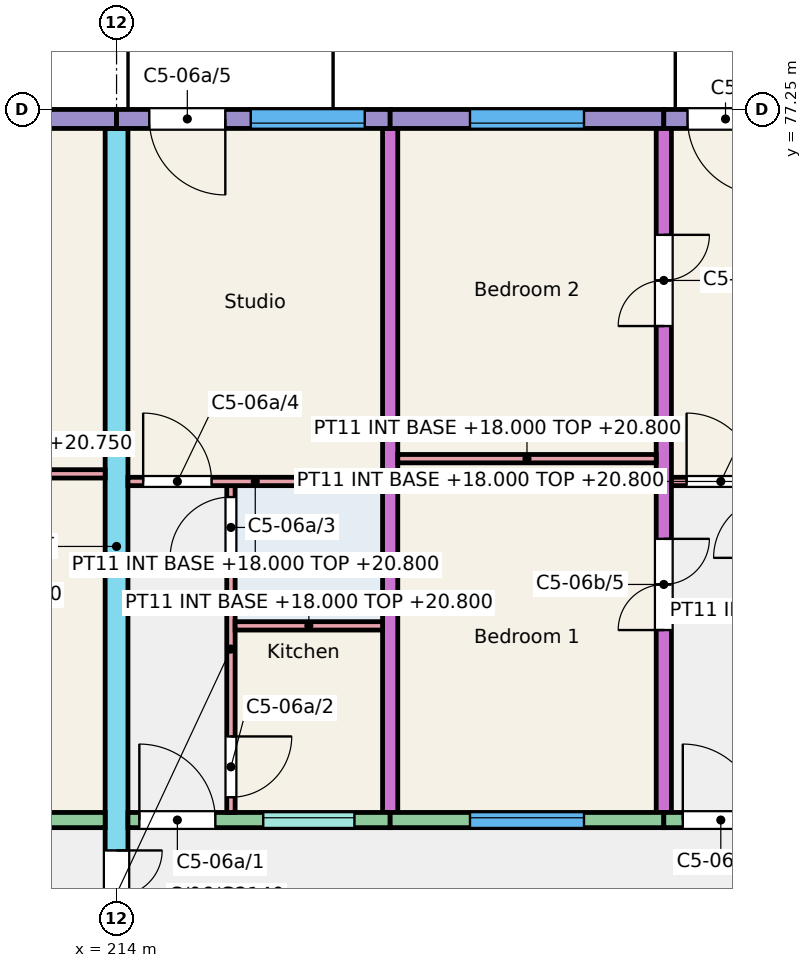
"""IFC4 building model, lengths in metres.
Left out: names, types, materials, properties, quantities, classifications, styles, units other than length and angle.
Written with IfcOpenShell. Run it as: python <this file> out.ifc"""

import sys

from ifc_helpers import new_model, si_unit, direction, frame, frame_2d, origin, place, context, subcontext, project, spatial, rectangle, extrude, element, fill, save


model = new_model("IFC4")
c1 = context("Model", 3, precision=1e-05, world=origin(), true_north=direction((0.0, 1.0)))
c2 = subcontext(c1, "Body", "Model", "MODEL_VIEW")
j1 = project(units=[si_unit("LENGTHUNIT", "METRE"), si_unit("PLANEANGLEUNIT", "RADIAN")], contexts=[c1])
p1 = place(None, origin())
s1 = spatial("IfcSite", under=j1, at=p1, CompositionType="ELEMENT")
p2 = place(p1, origin())
s2 = spatial("IfcBuilding", under=s1, at=p2, CompositionType="ELEMENT")
p3 = place(p2, frame((0.0, 0.0, 18.0)))
s3 = spatial("IfcBuildingStorey", under=s2, at=p3, CompositionType="ELEMENT", Elevation=18.0)
p4 = place(p3, frame((214.0, 66.0, 0.0), z_axis=(0.0, 0.0, 1.0), x_axis=(0.0, 1.0, 0.0)))
e1 = element("IfcWall", 1, at=p4, inside=s3, PredefinedType="SHEAR", context=c2, shape_type="SweptSolid", body=[
    extrude(rectangle(XDim=11.0, YDim=0.3, at=frame_2d((5.5, 0.0))), origin(), (0.0, 0.0, 1.0), 3.0),
])
p5 = place(p4, frame((0.3, 0.0, 0.0)))
e2 = element("IfcOpeningElement", 2, at=p5, cuts=e1, PredefinedType="OPENING", context=c2, shape_type="SweptSolid", body=[
    extrude(rectangle(XDim=1.2, YDim=2.1, at=frame_2d((0.6, 1.05))), frame((0.0, 0.16, 0.0), z_axis=(0.0, -1.0, 0.0), x_axis=(1.0, 0.0, 0.0)), (0.0, 0.0, 1.0), 0.32),
])
p6 = place(p3, frame((217.6, 68.0, 0.0), z_axis=(0.0, 0.0, 1.0), x_axis=(0.0, 1.0, 0.0)))
e3 = element("IfcWall", 3, at=p6, inside=s3, PredefinedType="SHEAR", context=c2, shape_type="SweptSolid", body=[
    extrude(rectangle(XDim=9.0, YDim=0.2, at=frame_2d((4.5, 0.0))), origin(), (0.0, 0.0, 1.0), 3.0),
])
p7 = place(p3, frame((221.2, 68.0, 0.0), z_axis=(0.0, 0.0, 1.0), x_axis=(0.0, 1.0, 0.0)))
e4 = element("IfcWall", 4, at=p7, inside=s3, PredefinedType="SHEAR", context=c2, shape_type="SweptSolid", body=[
    extrude(rectangle(XDim=9.0, YDim=0.2, at=frame_2d((4.5, 0.0))), origin(), (0.0, 0.0, 1.0), 3.0),
])
p8 = place(p7, frame((2.4, 0.0, 0.0)))
e5 = element("IfcOpeningElement", 5, at=p8, cuts=e4, PredefinedType="OPENING", context=c2, shape_type="SweptSolid", body=[
    extrude(rectangle(XDim=1.2, YDim=2.1, at=frame_2d((0.6, 1.05))), frame((0.0, 0.11, 0.0), z_axis=(0.0, -1.0, 0.0), x_axis=(1.0, 0.0, 0.0)), (0.0, 0.0, 1.0), 0.22),
])
p9 = place(p7, frame((6.4, 0.0, 0.0)))
e6 = element("IfcOpeningElement", 6, at=p9, cuts=e4, PredefinedType="OPENING", context=c2, shape_type="SweptSolid", body=[
    extrude(rectangle(XDim=1.2, YDim=2.1, at=frame_2d((0.6, 1.05))), frame((0.0, 0.11, 0.0), z_axis=(0.0, -1.0, 0.0), x_axis=(1.0, 0.0, 0.0)), (0.0, 0.0, 1.0), 0.22),
])
p10 = place(p3, frame((210.4, 77.125, 0.0), z_axis=(0.0, 0.0, 1.0), x_axis=(1.0, 0.0, 0.0)))
e7 = element("IfcWall", 7, at=p10, inside=s3, PredefinedType="SOLIDWALL", context=c2, shape_type="SweptSolid", body=[
    extrude(rectangle(XDim=3.6, YDim=0.25, at=frame_2d((1.8, 0.0))), origin(), (0.0, 0.0, 1.0), 3.0),
])
p11 = place(p10, frame((1.175, 0.0, 1.1)))
e8 = element("IfcOpeningElement", 8, at=p11, cuts=e7, PredefinedType="OPENING", context=c2, shape_type="SweptSolid", body=[
    extrude(rectangle(XDim=1.2, YDim=1.3, at=frame_2d((0.6, 0.65))), frame((0.0, 0.135, 0.0), z_axis=(0.0, -1.0, 0.0), x_axis=(1.0, 0.0, 0.0)), (0.0, 0.0, 1.0), 0.27),
])
p12 = place(p3, frame((210.4, 67.9, 0.0), z_axis=(0.0, 0.0, 1.0), x_axis=(1.0, 0.0, 0.0)))
e9 = element("IfcWall", 9, at=p12, inside=s3, PredefinedType="SOLIDWALL", context=c2, shape_type="SweptSolid", body=[
    extrude(rectangle(XDim=3.45, YDim=0.2, at=frame_2d((1.725, 0.0))), origin(), (0.0, 0.0, 1.0), 3.0),
])
p13 = place(p12, frame((1.025, 0.0, 0.9)))
e10 = element("IfcOpeningElement", 10, at=p13, cuts=e9, PredefinedType="OPENING", context=c2, shape_type="SweptSolid", body=[
    extrude(rectangle(XDim=1.5, YDim=1.5, at=frame_2d((0.75, 0.75))), frame((0.0, 0.11, 0.0), z_axis=(0.0, -1.0, 0.0), x_axis=(1.0, 0.0, 0.0)), (0.0, 0.0, 1.0), 0.22),
])
p14 = place(p3, frame((214.0, 77.125, 0.0), z_axis=(0.0, 0.0, 1.0), x_axis=(1.0, 0.0, 0.0)))
e11 = element("IfcWall", 11, at=p14, inside=s3, PredefinedType="SOLIDWALL", context=c2, shape_type="SweptSolid", body=[
    extrude(rectangle(XDim=3.6, YDim=0.25, at=frame_2d((1.8, 0.0))), origin(), (0.0, 0.0, 1.0), 3.0),
])
p15 = place(p14, frame((1.765, 0.0, 0.9)))
e12 = element("IfcOpeningElement", 12, at=p15, cuts=e11, PredefinedType="OPENING", context=c2, shape_type="SweptSolid", body=[
    extrude(rectangle(XDim=1.5, YDim=1.5, at=frame_2d((0.75, 0.75))), frame((0.0, 0.135, 0.0), z_axis=(0.0, -1.0, 0.0), x_axis=(1.0, 0.0, 0.0)), (0.0, 0.0, 1.0), 0.27),
])
p16 = place(p14, frame((0.431, 0.0, 0.0)))
e13 = element("IfcOpeningElement", 13, at=p16, cuts=e11, PredefinedType="OPENING", context=c2, shape_type="SweptSolid", body=[
    extrude(rectangle(XDim=1.0, YDim=2.1, at=frame_2d((0.5, 1.05))), frame((0.0, 0.135, 0.0), z_axis=(0.0, -1.0, 0.0), x_axis=(1.0, 0.0, 0.0)), (0.0, 0.0, 1.0), 0.27),
])
p17 = place(p3, frame((214.15, 67.9, 0.0), z_axis=(0.0, 0.0, 1.0), x_axis=(1.0, 0.0, 0.0)))
e14 = element("IfcWall", 14, at=p17, inside=s3, PredefinedType="SOLIDWALL", context=c2, shape_type="SweptSolid", body=[
    extrude(rectangle(XDim=3.45, YDim=0.2, at=frame_2d((1.725, 0.0))), origin(), (0.0, 0.0, 1.0), 3.0),
])
p18 = place(p17, frame((1.78, 0.0, 1.1)))
e15 = element("IfcOpeningElement", 15, at=p18, cuts=e14, PredefinedType="OPENING", context=c2, shape_type="SweptSolid", body=[
    extrude(rectangle(XDim=1.2, YDim=1.3, at=frame_2d((0.6, 0.65))), frame((0.0, 0.11, 0.0), z_axis=(0.0, -1.0, 0.0), x_axis=(1.0, 0.0, 0.0)), (0.0, 0.0, 1.0), 0.22),
])
p19 = place(p17, frame((0.15, 0.0, 0.0)))
e16 = element("IfcOpeningElement", 16, at=p19, cuts=e14, PredefinedType="OPENING", context=c2, shape_type="SweptSolid", body=[
    extrude(rectangle(XDim=1.0, YDim=2.1, at=frame_2d((0.5, 1.05))), frame((0.0, 0.11, 0.0), z_axis=(0.0, -1.0, 0.0), x_axis=(1.0, 0.0, 0.0)), (0.0, 0.0, 1.0), 0.22),
])
p20 = place(p3, frame((217.6, 77.125, 0.0), z_axis=(0.0, 0.0, 1.0), x_axis=(1.0, 0.0, 0.0)))
e17 = element("IfcWall", 17, at=p20, inside=s3, PredefinedType="SOLIDWALL", context=c2, shape_type="SweptSolid", body=[
    extrude(rectangle(XDim=3.6, YDim=0.25, at=frame_2d((1.8, 0.0))), origin(), (0.0, 0.0, 1.0), 3.0),
])
p21 = place(p20, frame((1.05, 0.0, 0.9)))
e18 = element("IfcOpeningElement", 18, at=p21, cuts=e17, PredefinedType="OPENING", context=c2, shape_type="SweptSolid", body=[
    extrude(rectangle(XDim=1.5, YDim=1.5, at=frame_2d((0.75, 0.75))), frame((0.0, 0.135, 0.0), z_axis=(0.0, -1.0, 0.0), x_axis=(1.0, 0.0, 0.0)), (0.0, 0.0, 1.0), 0.27),
])
p22 = place(p3, frame((217.6, 67.9, 0.0), z_axis=(0.0, 0.0, 1.0), x_axis=(1.0, 0.0, 0.0)))
e19 = element("IfcWall", 19, at=p22, inside=s3, PredefinedType="SOLIDWALL", context=c2, shape_type="SweptSolid", body=[
    extrude(rectangle(XDim=3.6, YDim=0.2, at=frame_2d((1.8, 0.0))), origin(), (0.0, 0.0, 1.0), 3.0),
])
p23 = place(p22, frame((1.05, 0.0, 0.9)))
e20 = element("IfcOpeningElement", 20, at=p23, cuts=e19, PredefinedType="OPENING", context=c2, shape_type="SweptSolid", body=[
    extrude(rectangle(XDim=1.5, YDim=1.5, at=frame_2d((0.75, 0.75))), frame((0.0, 0.11, 0.0), z_axis=(0.0, -1.0, 0.0), x_axis=(1.0, 0.0, 0.0)), (0.0, 0.0, 1.0), 0.22),
])
p24 = place(p3, frame((221.2, 77.125, 0.0), z_axis=(0.0, 0.0, 1.0), x_axis=(1.0, 0.0, 0.0)))
e21 = element("IfcWall", 21, at=p24, inside=s3, PredefinedType="SOLIDWALL", context=c2, shape_type="SweptSolid", body=[
    extrude(rectangle(XDim=3.6, YDim=0.25, at=frame_2d((1.8, 0.0))), origin(), (0.0, 0.0, 1.0), 3.0),
])
p25 = place(p24, frame((1.694, 0.0, 0.9)))
e22 = element("IfcOpeningElement", 22, at=p25, cuts=e21, PredefinedType="OPENING", context=c2, shape_type="SweptSolid", body=[
    extrude(rectangle(XDim=1.5, YDim=1.5, at=frame_2d((0.75, 0.75))), frame((0.0, 0.135, 0.0), z_axis=(0.0, -1.0, 0.0), x_axis=(1.0, 0.0, 0.0)), (0.0, 0.0, 1.0), 0.27),
])
p26 = place(p24, frame((0.312, 0.0, 0.0)))
e23 = element("IfcOpeningElement", 23, at=p26, cuts=e21, PredefinedType="OPENING", context=c2, shape_type="SweptSolid", body=[
    extrude(rectangle(XDim=1.0, YDim=2.1, at=frame_2d((0.5, 1.05))), frame((0.0, 0.135, 0.0), z_axis=(0.0, -1.0, 0.0), x_axis=(1.0, 0.0, 0.0)), (0.0, 0.0, 1.0), 0.27),
])
p27 = place(p3, frame((221.2, 67.9, 0.0), z_axis=(0.0, 0.0, 1.0), x_axis=(1.0, 0.0, 0.0)))
e24 = element("IfcWall", 24, at=p27, inside=s3, PredefinedType="SOLIDWALL", context=c2, shape_type="SweptSolid", body=[
    extrude(rectangle(XDim=3.6, YDim=0.2, at=frame_2d((1.8, 0.0))), origin(), (0.0, 0.0, 1.0), 3.0),
])
p28 = place(p27, frame((1.893, 0.0, 1.1)))
e25 = element("IfcOpeningElement", 25, at=p28, cuts=e24, PredefinedType="OPENING", context=c2, shape_type="SweptSolid", body=[
    extrude(rectangle(XDim=1.2, YDim=1.3, at=frame_2d((0.6, 0.65))), frame((0.0, 0.11, 0.0), z_axis=(0.0, -1.0, 0.0), x_axis=(1.0, 0.0, 0.0)), (0.0, 0.0, 1.0), 0.22),
])
p29 = place(p27, frame((0.25, 0.0, 0.0)))
e26 = element("IfcOpeningElement", 26, at=p29, cuts=e24, PredefinedType="OPENING", context=c2, shape_type="SweptSolid", body=[
    extrude(rectangle(XDim=1.0, YDim=2.1, at=frame_2d((0.5, 1.05))), frame((0.0, 0.11, 0.0), z_axis=(0.0, -1.0, 0.0), x_axis=(1.0, 0.0, 0.0)), (0.0, 0.0, 1.0), 0.22),
])
p30 = place(p3, frame((210.5, 72.455, 0.0), z_axis=(0.0, 0.0, 1.0), x_axis=(1.0, 0.0, 0.0)))
e27 = element("IfcWall", 27, at=p30, inside=s3, PredefinedType="PARTITIONING", context=c2, shape_type="SweptSolid", body=[
    extrude(rectangle(XDim=3.35, YDim=0.11, at=frame_2d((1.675, 0.0))), origin(), (0.0, 0.0, 1.0), 2.75),
])
p31 = place(p3, frame((215.505, 68.0, 0.0), z_axis=(0.0, 0.0, 1.0), x_axis=(0.0, 1.0, 0.0)))
e28 = element("IfcWall", 28, at=p31, inside=s3, PredefinedType="PARTITIONING", context=c2, shape_type="SweptSolid", body=[
    extrude(rectangle(XDim=4.3, YDim=0.11, at=frame_2d((2.15, 0.0))), origin(), (0.0, 0.0, 1.0), 2.8),
])
p32 = place(p31, frame((0.2, 0.0, 0.0)))
e29 = element("IfcOpeningElement", 29, at=p32, cuts=e28, PredefinedType="OPENING", context=c2, shape_type="SweptSolid", body=[
    extrude(rectangle(XDim=0.8, YDim=2.1, at=frame_2d((0.4, 1.05))), frame((0.0, 0.065, 0.0), z_axis=(0.0, -1.0, 0.0), x_axis=(1.0, 0.0, 0.0)), (0.0, 0.0, 1.0), 0.13),
])
p33 = place(p31, frame((3.35, 0.0, 0.0)))
e30 = element("IfcOpeningElement", 30, at=p33, cuts=e28, PredefinedType="OPENING", context=c2, shape_type="SweptSolid", body=[
    extrude(rectangle(XDim=0.8, YDim=2.1, at=frame_2d((0.4, 1.05))), frame((0.0, 0.065, 0.0), z_axis=(0.0, -1.0, 0.0), x_axis=(1.0, 0.0, 0.0)), (0.0, 0.0, 1.0), 0.13),
])
p34 = place(p3, frame((215.56, 70.455, 0.0), z_axis=(0.0, 0.0, 1.0), x_axis=(1.0, 0.0, 0.0)))
e31 = element("IfcWall", 31, at=p34, inside=s3, PredefinedType="PARTITIONING", context=c2, shape_type="SweptSolid", body=[
    extrude(rectangle(XDim=1.94, YDim=0.11, at=frame_2d((0.97, 0.0))), origin(), (0.0, 0.0, 1.0), 2.8),
])
p35 = place(p3, frame((214.15, 72.355, 0.0), z_axis=(0.0, 0.0, 1.0), x_axis=(1.0, 0.0, 0.0)))
e32 = element("IfcWall", 32, at=p35, inside=s3, PredefinedType="PARTITIONING", context=c2, shape_type="SweptSolid", body=[
    extrude(rectangle(XDim=3.35, YDim=0.11, at=frame_2d((1.675, 0.0))), origin(), (0.0, 0.0, 1.0), 2.8),
])
p36 = place(p35, frame((0.2, 0.0, 0.0)))
e33 = element("IfcOpeningElement", 33, at=p36, cuts=e32, PredefinedType="OPENING", context=c2, shape_type="SweptSolid", body=[
    extrude(rectangle(XDim=0.9, YDim=2.1, at=frame_2d((0.45, 1.05))), frame((0.0, 0.065, 0.0), z_axis=(0.0, -1.0, 0.0), x_axis=(1.0, 0.0, 0.0)), (0.0, 0.0, 1.0), 0.13),
])
p37 = place(p3, frame((221.3, 72.355, 0.0), z_axis=(0.0, 0.0, 1.0), x_axis=(1.0, 0.0, 0.0)))
e34 = element("IfcWall", 34, at=p37, inside=s3, PredefinedType="PARTITIONING", context=c2, shape_type="SweptSolid", body=[
    extrude(rectangle(XDim=3.375, YDim=0.11, at=frame_2d((1.688, 0.0))), origin(), (0.0, 0.0, 1.0), 2.8),
])
p38 = place(p37, frame((0.2, 0.0, 0.0)))
e35 = element("IfcOpeningElement", 35, at=p38, cuts=e34, PredefinedType="OPENING", context=c2, shape_type="SweptSolid", body=[
    extrude(rectangle(XDim=0.9, YDim=2.1, at=frame_2d((0.45, 1.05))), frame((0.0, 0.065, 0.0), z_axis=(0.0, -1.0, 0.0), x_axis=(1.0, 0.0, 0.0)), (0.0, 0.0, 1.0), 0.13),
])
p39 = place(p3, frame((217.7, 72.655, 0.0), z_axis=(0.0, 0.0, 1.0), x_axis=(1.0, 0.0, 0.0)))
e36 = element("IfcWall", 36, at=p39, inside=s3, PredefinedType="PARTITIONING", context=c2, shape_type="SweptSolid", body=[
    extrude(rectangle(XDim=3.4, YDim=0.11, at=frame_2d((1.7, 0.0))), origin(), (0.0, 0.0, 1.0), 2.8),
])
p40 = place(p18, origin())
e37 = element("IfcWindow", 37, at=p40, inside=s3, PartitioningType="SINGLE_PANEL", PredefinedType="WINDOW", context=c2, shape_type="SweptSolid", body=[
    extrude(rectangle(XDim=1.2, YDim=1.3, at=frame_2d((0.6, 0.65))), frame((0.0, 0.06, 0.0), z_axis=(0.0, -1.0, 0.0), x_axis=(1.0, 0.0, 0.0)), (0.0, 0.0, 1.0), 0.06),
])
fill(e15, e37)
p41 = place(p15, origin())
e38 = element("IfcWindow", 38, at=p41, inside=s3, PartitioningType="SINGLE_PANEL", PredefinedType="WINDOW", context=c2, shape_type="SweptSolid", body=[
    extrude(rectangle(XDim=1.5, YDim=1.5, at=frame_2d((0.75, 0.75))), frame((0.0, -0.025, 0.0), z_axis=(0.0, -1.0, 0.0), x_axis=(1.0, 0.0, 0.0)), (0.0, 0.0, 1.0), 0.06),
])
fill(e12, e38)
p42 = place(p23, origin())
e39 = element("IfcWindow", 39, at=p42, inside=s3, PartitioningType="SINGLE_PANEL", PredefinedType="WINDOW", context=c2, shape_type="SweptSolid", body=[
    extrude(rectangle(XDim=1.5, YDim=1.5, at=frame_2d((0.75, 0.75))), frame((0.0, 0.06, 0.0), z_axis=(0.0, -1.0, 0.0), x_axis=(1.0, 0.0, 0.0)), (0.0, 0.0, 1.0), 0.06),
])
fill(e20, e39)
p43 = place(p21, origin())
e40 = element("IfcWindow", 40, at=p43, inside=s3, PartitioningType="SINGLE_PANEL", PredefinedType="WINDOW", context=c2, shape_type="SweptSolid", body=[
    extrude(rectangle(XDim=1.5, YDim=1.5, at=frame_2d((0.75, 0.75))), frame((0.0, -0.025, 0.0), z_axis=(0.0, -1.0, 0.0), x_axis=(1.0, 0.0, 0.0)), (0.0, 0.0, 1.0), 0.06),
])
fill(e18, e40)
p44 = place(p19, origin())
e41 = element("IfcDoor", 41, at=p44, inside=s3, OperationType="SINGLE_SWING_LEFT", PredefinedType="DOOR", context=c2, shape_type="SweptSolid", body=[
    extrude(rectangle(XDim=1.0, YDim=2.1, at=frame_2d((0.5, 1.05))), frame((0.0, 0.025, 0.0), z_axis=(0.0, -1.0, 0.0), x_axis=(1.0, 0.0, 0.0)), (0.0, 0.0, 1.0), 0.05),
])
fill(e16, e41)
p45 = place(p32, origin())
e42 = element("IfcDoor", 42, at=p45, inside=s3, OperationType="SINGLE_SWING_RIGHT", PredefinedType="DOOR", context=c2, shape_type="SweptSolid", body=[
    extrude(rectangle(XDim=0.8, YDim=2.1, at=frame_2d((0.4, 1.05))), frame((0.0, 0.025, 0.0), z_axis=(0.0, -1.0, 0.0), x_axis=(1.0, 0.0, 0.0)), (0.0, 0.0, 1.0), 0.05),
])
fill(e29, e42)
p46 = place(p33, origin())
e43 = element("IfcDoor", 43, at=p46, inside=s3, OperationType="SINGLE_SWING_LEFT", PredefinedType="DOOR", context=c2, shape_type="SweptSolid", body=[
    extrude(rectangle(XDim=0.8, YDim=2.1, at=frame_2d((0.4, 1.05))), frame((0.0, 0.025, 0.0), z_axis=(0.0, -1.0, 0.0), x_axis=(1.0, 0.0, 0.0)), (0.0, 0.0, 1.0), 0.05),
])
fill(e30, e43)
p47 = place(p36, origin())
e44 = element("IfcDoor", 44, at=p47, inside=s3, OperationType="SINGLE_SWING_LEFT", PredefinedType="DOOR", context=c2, shape_type="SweptSolid", body=[
    extrude(rectangle(XDim=0.9, YDim=2.1, at=frame_2d((0.45, 1.05))), frame((0.0, 0.025, 0.0), z_axis=(0.0, -1.0, 0.0), x_axis=(1.0, 0.0, 0.0)), (0.0, 0.0, 1.0), 0.05),
])
fill(e33, e44)
p48 = place(p16, origin())
e45 = element("IfcDoor", 45, at=p48, inside=s3, OperationType="SINGLE_SWING_RIGHT", PredefinedType="DOOR", context=c2, shape_type="SweptSolid", body=[
    extrude(rectangle(XDim=1.0, YDim=2.1, at=frame_2d((0.5, 1.05))), frame((0.0, 0.025, 0.0), z_axis=(0.0, -1.0, 0.0), x_axis=(1.0, 0.0, 0.0)), (0.0, 0.0, 1.0), 0.05),
])
fill(e13, e45)
p49 = place(p29, origin())
e46 = element("IfcDoor", 46, at=p49, inside=s3, OperationType="SINGLE_SWING_LEFT", PredefinedType="DOOR", context=c2, shape_type="SweptSolid", body=[
    extrude(rectangle(XDim=1.0, YDim=2.1, at=frame_2d((0.5, 1.05))), frame((0.0, 0.025, 0.0), z_axis=(0.0, -1.0, 0.0), x_axis=(1.0, 0.0, 0.0)), (0.0, 0.0, 1.0), 0.05),
])
fill(e26, e46)
p50 = place(p38, origin())
e47 = element("IfcDoor", 47, at=p50, inside=s3, OperationType="SINGLE_SWING_LEFT", PredefinedType="DOOR", context=c2, shape_type="SweptSolid", body=[
    extrude(rectangle(XDim=0.9, YDim=2.1, at=frame_2d((0.45, 1.05))), frame((0.0, 0.025, 0.0), z_axis=(0.0, -1.0, 0.0), x_axis=(1.0, 0.0, 0.0)), (0.0, 0.0, 1.0), 0.05),
])
fill(e35, e47)
p51 = place(p8, origin())
e48 = element("IfcDoor", 48, at=p51, inside=s3, OperationType="DOUBLE_DOOR_SINGLE_SWING", PredefinedType="DOOR", context=c2, shape_type="SweptSolid", body=[
    extrude(rectangle(XDim=1.2, YDim=2.1, at=frame_2d((0.6, 1.05))), frame((0.0, 0.025, 0.0), z_axis=(0.0, -1.0, 0.0), x_axis=(1.0, 0.0, 0.0)), (0.0, 0.0, 1.0), 0.05),
])
fill(e5, e48)
p52 = place(p9, origin())
e49 = element("IfcDoor", 49, at=p52, inside=s3, OperationType="DOUBLE_DOOR_SINGLE_SWING", PredefinedType="DOOR", context=c2, shape_type="SweptSolid", body=[
    extrude(rectangle(XDim=1.2, YDim=2.1, at=frame_2d((0.6, 1.05))), frame((0.0, 0.025, 0.0), z_axis=(0.0, -1.0, 0.0), x_axis=(1.0, 0.0, 0.0)), (0.0, 0.0, 1.0), 0.05),
])
fill(e6, e49)
p53 = place(p26, origin())
e50 = element("IfcDoor", 50, at=p53, inside=s3, OperationType="SINGLE_SWING_RIGHT", PredefinedType="DOOR", context=c2, shape_type="SweptSolid", body=[
    extrude(rectangle(XDim=1.0, YDim=2.1, at=frame_2d((0.5, 1.05))), frame((0.0, 0.025, 0.0), z_axis=(0.0, -1.0, 0.0), x_axis=(1.0, 0.0, 0.0)), (0.0, 0.0, 1.0), 0.05),
])
fill(e23, e50)
p54 = place(p5, origin())
e51 = element("IfcDoor", 51, at=p54, inside=s3, OperationType="DOUBLE_DOOR_SINGLE_SWING", PredefinedType="DOOR", context=c2, shape_type="SweptSolid", body=[
    extrude(rectangle(XDim=1.2, YDim=2.1, at=frame_2d((0.6, 1.05))), frame((0.0, 0.025, 0.0), z_axis=(0.0, -1.0, 0.0), x_axis=(1.0, 0.0, 0.0)), (0.0, 0.0, 1.0), 0.05),
])
fill(e2, e51)
save(model, sys.argv[1])
